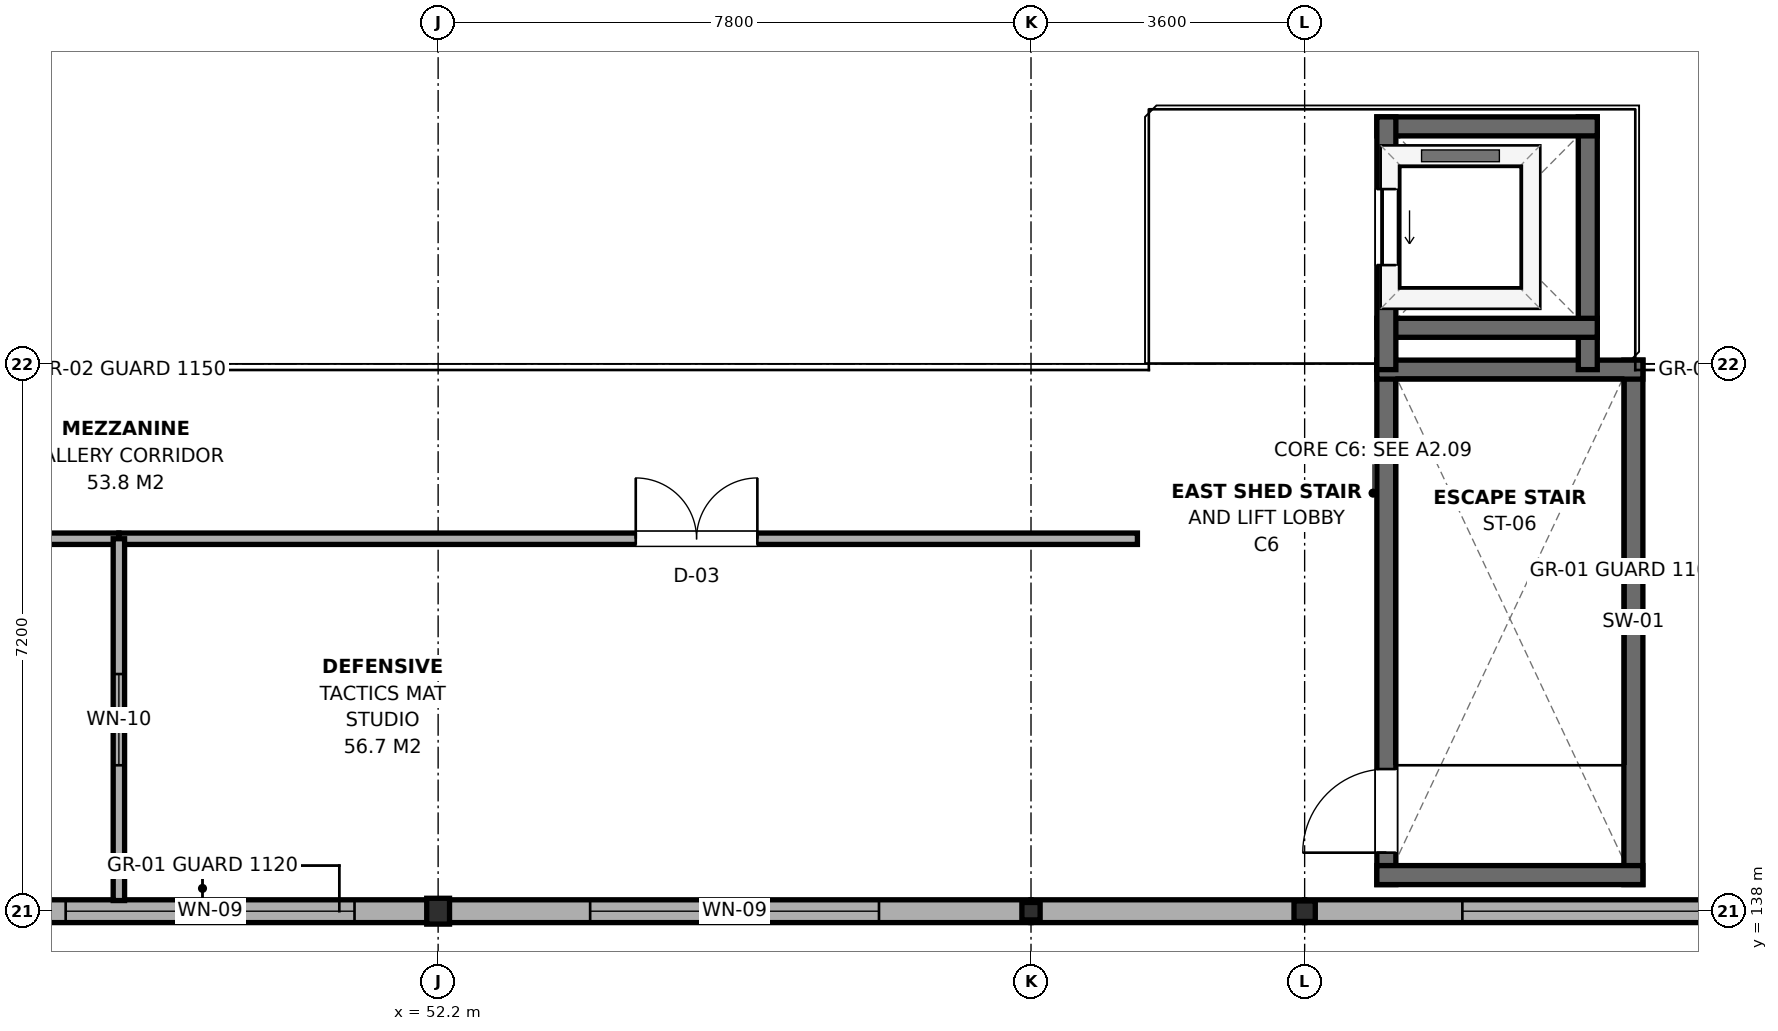
"""IFC4 building model, lengths in metres.
Left out: names, types, materials, properties, quantities, classifications, styles, units other than length and angle.
Written with IfcOpenShell. Run it as: python <this file> out.ifc"""

import sys

from ifc_helpers import new_model, si_unit, direction, frame, frame_2d, origin, origin_2d, place, context, subcontext, project, spatial, rectangle, i_section, extrude, element, fill, save


model = new_model("IFC4")
c1 = context("Model", 3, precision=1e-05, world=origin(), true_north=direction((0.0, 1.0)))
c2 = subcontext(c1, "Body", "Model", "MODEL_VIEW")
j1 = project(units=[si_unit("LENGTHUNIT", "METRE"), si_unit("PLANEANGLEUNIT", "RADIAN")], contexts=[c1])
p1 = place(None, origin())
s1 = spatial("IfcSite", under=j1, at=p1, CompositionType="ELEMENT")
p2 = place(p1, origin())
s2 = spatial("IfcBuilding", under=s1, at=p2, CompositionType="ELEMENT")
p3 = place(p2, frame((0.0, 0.0, 4.8)))
s3 = spatial("IfcBuildingStorey", under=s2, at=p3, CompositionType="ELEMENT", Elevation=4.8)
p4 = place(p3, frame((52.2, 138.0, 0.0), z_axis=(0.0, 0.0, 1.0), x_axis=(1.0, 0.0, 0.0)))
e1 = element("IfcColumn", 1, at=p4, inside=s3, PredefinedType="COLUMN", context=c2, shape_type="SweptSolid", body=[
    extrude(i_section(OverallWidth=0.3, OverallDepth=0.34, WebThickness=0.012, FlangeThickness=0.021, FilletRadius=0.027, at=origin_2d()), origin(), (0.0, 0.0, 1.0), 4.65),
])
p5 = place(p3, frame((60.0, 138.0, 0.0), z_axis=(0.0, 0.0, 1.0), x_axis=(1.0, 0.0, 0.0)))
e2 = element("IfcColumn", 2, at=p5, inside=s3, PredefinedType="COLUMN", context=c2, shape_type="SweptSolid", body=[
    extrude(i_section(OverallWidth=0.24, OverallDepth=0.23, WebThickness=0.008, FlangeThickness=0.012, FilletRadius=0.021, at=origin_2d()), origin(), (0.0, 0.0, 1.0), 4.65),
])
p6 = place(p3, frame((63.6, 138.0, 0.0), z_axis=(0.0, 0.0, 1.0), x_axis=(1.0, 0.0, 0.0)))
e3 = element("IfcColumn", 3, at=p6, inside=s3, PredefinedType="COLUMN", context=c2, shape_type="SweptSolid", body=[
    extrude(i_section(OverallWidth=0.28, OverallDepth=0.27, WebThickness=0.008, FlangeThickness=0.013, FilletRadius=0.024, at=origin_2d()), origin(), (0.0, 0.0, 1.0), 4.65),
])
p7 = place(p3, frame((46.2, 138.0, 0.0), z_axis=(0.0, 0.0, 1.0), x_axis=(1.0, 0.0, 0.0)))
e4 = element("IfcWall", 4, at=p7, inside=s3, PredefinedType="SOLIDWALL", context=c2, shape_type="SweptSolid", body=[
    extrude(rectangle(XDim=6.0, YDim=0.3, at=frame_2d((3.0, 0.0))), origin(), (0.0, 0.0, 1.0), 3.98),
])
p8 = place(p7, frame((1.1, 0.0, 1.35)))
e5 = element("IfcOpeningElement", 5, at=p8, cuts=e4, PredefinedType="OPENING", context=c2, shape_type="SweptSolid", body=[
    extrude(rectangle(XDim=3.8, YDim=1.6, at=frame_2d((1.9, 0.8))), frame((0.0, 0.165, 0.0), z_axis=(0.0, -1.0, 0.0), x_axis=(1.0, 0.0, 0.0)), (0.0, 0.0, 1.0), 0.33),
])
p9 = place(p3, frame((52.2, 138.0, 0.0), z_axis=(0.0, 0.0, 1.0), x_axis=(1.0, 0.0, 0.0)))
e6 = element("IfcWall", 6, at=p9, inside=s3, PredefinedType="SOLIDWALL", context=c2, shape_type="SweptSolid", body=[
    extrude(rectangle(XDim=7.8, YDim=0.3, at=frame_2d((3.9, 0.0))), origin(), (0.0, 0.0, 1.0), 3.98),
])
p10 = place(p9, frame((2.0, 0.0, 1.35)))
e7 = element("IfcOpeningElement", 7, at=p10, cuts=e6, PredefinedType="OPENING", context=c2, shape_type="SweptSolid", body=[
    extrude(rectangle(XDim=3.8, YDim=1.6, at=frame_2d((1.9, 0.8))), frame((0.0, 0.165, 0.0), z_axis=(0.0, -1.0, 0.0), x_axis=(1.0, 0.0, 0.0)), (0.0, 0.0, 1.0), 0.33),
])
p11 = place(p3, frame((60.0, 138.0, 0.0), z_axis=(0.0, 0.0, 1.0), x_axis=(1.0, 0.0, 0.0)))
e8 = element("IfcWall", 8, at=p11, inside=s3, PredefinedType="SOLIDWALL", context=c2, shape_type="SweptSolid", body=[
    extrude(rectangle(XDim=3.6, YDim=0.3, at=frame_2d((1.8, 0.0))), origin(), (0.0, 0.0, 1.0), 3.98),
])
p12 = place(p3, frame((63.6, 138.0, 0.0), z_axis=(0.0, 0.0, 1.0), x_axis=(1.0, 0.0, 0.0)))
e9 = element("IfcWall", 9, at=p12, inside=s3, PredefinedType="SOLIDWALL", context=c2, shape_type="SweptSolid", body=[
    extrude(rectangle(XDim=7.95, YDim=0.3, at=frame_2d((3.975, 0.0))), origin(), (0.0, 0.0, 1.0), 3.98),
])
p13 = place(p12, frame((2.075, 0.0, 1.35)))
e10 = element("IfcOpeningElement", 10, at=p13, cuts=e9, PredefinedType="OPENING", context=c2, shape_type="SweptSolid", body=[
    extrude(rectangle(XDim=3.8, YDim=1.6, at=frame_2d((1.9, 0.8))), frame((0.0, 0.165, 0.0), z_axis=(0.0, -1.0, 0.0), x_axis=(1.0, 0.0, 0.0)), (0.0, 0.0, 1.0), 0.33),
])
p14 = place(p3, frame((64.675, 138.35, 0.0), z_axis=(0.0, 0.0, 1.0), x_axis=(0.0, 1.0, 0.0)))
e11 = element("IfcWall", 11, at=p14, inside=s3, PredefinedType="SHEAR", context=c2, shape_type="SweptSolid", body=[
    extrude(rectangle(XDim=6.9, YDim=0.25, at=frame_2d((3.45, 0.0))), origin(), (0.0, 0.0, 1.0), 4.25),
])
p15 = place(p14, frame((0.42, 0.0, 0.0)))
e12 = element("IfcOpeningElement", 12, at=p15, cuts=e11, PredefinedType="OPENING", context=c2, shape_type="SweptSolid", body=[
    extrude(rectangle(XDim=1.1, YDim=2.15, at=frame_2d((0.55, 1.075))), frame((0.0, 0.14, 0.0), z_axis=(0.0, -1.0, 0.0), x_axis=(1.0, 0.0, 0.0)), (0.0, 0.0, 1.0), 0.28),
])
p16 = place(p3, frame((67.925, 138.35, 0.0), z_axis=(0.0, 0.0, 1.0), x_axis=(0.0, 1.0, 0.0)))
e13 = element("IfcWall", 13, at=p16, inside=s3, PredefinedType="SHEAR", context=c2, shape_type="SweptSolid", body=[
    extrude(rectangle(XDim=6.9, YDim=0.25, at=frame_2d((3.45, 0.0))), origin(), (0.0, 0.0, 1.0), 4.25),
])
for number, where, z_axis, x_axis in (
    (14, (64.55, 138.475, 0.0), (0.0, 0.0, 1.0), (1.0, 0.0, 0.0)),
    (15, (64.55, 145.125, 0.0), (0.0, 0.0, 1.0), (1.0, 0.0, 0.0)),
):
    element("IfcWall", number, at=place(p3, frame(where, z_axis=z_axis, x_axis=x_axis)), inside=s3, PredefinedType="SHEAR", context=c2, shape_type="SweptSolid", body=[
        extrude(rectangle(XDim=3.5, YDim=0.25, at=frame_2d((1.75, 0.0))), origin(), (0.0, 0.0, 1.0), 4.25),
    ])
p17 = place(p3, frame((67.325, 145.125, -0.24), z_axis=(0.0, 0.0, 1.0), x_axis=(0.0, 1.0, 0.0)))
e16 = element("IfcWall", 16, at=p17, inside=s3, PredefinedType="SHEAR", context=c2, shape_type="SweptSolid", body=[
    extrude(rectangle(XDim=3.325, YDim=0.25, at=frame_2d((1.663, 0.0))), origin(), (0.0, 0.0, 1.0), 4.22),
])
for number, where, z_axis, x_axis in (
    (17, (64.55, 145.675, -0.24), (0.0, 0.0, 1.0), (1.0, 0.0, 0.0)),
    (18, (64.55, 148.325, -0.24), (0.0, 0.0, 1.0), (1.0, 0.0, 0.0)),
):
    element("IfcWall", number, at=place(p3, frame(where, z_axis=z_axis, x_axis=x_axis)), inside=s3, PredefinedType="SHEAR", context=c2, shape_type="SweptSolid", body=[
        extrude(rectangle(XDim=2.9, YDim=0.25, at=frame_2d((1.45, 0.0))), origin(), (0.0, 0.0, 1.0), 4.22),
    ])
p18 = place(p3, frame((64.675, 145.125, -0.24), z_axis=(0.0, 0.0, 1.0), x_axis=(0.0, 1.0, 0.0)))
e19 = element("IfcWall", 19, at=p18, inside=s3, PredefinedType="SHEAR", context=c2, shape_type="SweptSolid", body=[
    extrude(rectangle(XDim=3.325, YDim=0.25, at=frame_2d((1.663, 0.0))), origin(), (0.0, 0.0, 1.0), 4.22),
])
p19 = place(p18, frame((1.375, 0.0, 0.24)))
e20 = element("IfcOpeningElement", 20, at=p19, cuts=e19, PredefinedType="OPENING", context=c2, shape_type="SweptSolid", body=[
    extrude(rectangle(XDim=1.0, YDim=2.15, at=frame_2d((0.5, 1.075))), frame((0.0, 0.14, 0.0), z_axis=(0.0, -1.0, 0.0), x_axis=(1.0, 0.0, 0.0)), (0.0, 0.0, 1.0), 0.28),
])
p20 = place(p3, frame((33.8, 142.9, 0.0), z_axis=(0.0, 0.0, 1.0), x_axis=(1.0, 0.0, 0.0)))
e21 = element("IfcWall", 21, at=p20, inside=s3, PredefinedType="PARTITIONING", context=c2, shape_type="SweptSolid", body=[
    extrude(rectangle(XDim=14.2, YDim=0.15, at=frame_2d((7.1, 0.0))), origin(), (0.0, 0.0, 1.0), 3.975),
])
p21 = place(p20, frame((2.6, 0.0, 0.0)))
e22 = element("IfcOpeningElement", 22, at=p21, cuts=e21, PredefinedType="OPENING", context=c2, shape_type="SweptSolid", body=[
    extrude(rectangle(XDim=1.6, YDim=2.15, at=frame_2d((0.8, 1.075))), frame((0.0, 0.09, 0.0), z_axis=(0.0, -1.0, 0.0), x_axis=(1.0, 0.0, 0.0)), (0.0, 0.0, 1.0), 0.18),
])
p22 = place(p20, frame((8.924, 0.0, 0.95)))
e23 = element("IfcOpeningElement", 23, at=p22, cuts=e21, PredefinedType="OPENING", context=c2, shape_type="SweptSolid", body=[
    extrude(rectangle(XDim=2.6, YDim=1.5, at=frame_2d((1.3, 0.75))), frame((0.0, 0.09, 0.0), z_axis=(0.0, -1.0, 0.0), x_axis=(1.0, 0.0, 0.0)), (0.0, 0.0, 1.0), 0.18),
])
p23 = place(p3, frame((48.0, 142.9, 0.0), z_axis=(0.0, 0.0, 1.0), x_axis=(1.0, 0.0, 0.0)))
e24 = element("IfcWall", 24, at=p23, inside=s3, PredefinedType="PARTITIONING", context=c2, shape_type="SweptSolid", body=[
    extrude(rectangle(XDim=13.4, YDim=0.15, at=frame_2d((6.7, 0.0))), origin(), (0.0, 0.0, 1.0), 3.975),
])
p24 = place(p23, frame((6.8, 0.0, 0.0)))
e25 = element("IfcOpeningElement", 25, at=p24, cuts=e24, PredefinedType="OPENING", context=c2, shape_type="SweptSolid", body=[
    extrude(rectangle(XDim=1.6, YDim=2.15, at=frame_2d((0.8, 1.075))), frame((0.0, 0.09, 0.0), z_axis=(0.0, -1.0, 0.0), x_axis=(1.0, 0.0, 0.0)), (0.0, 0.0, 1.0), 0.18),
])
p25 = place(p3, frame((48.0, 138.14, 0.0), z_axis=(0.0, 0.0, 1.0), x_axis=(0.0, 1.0, 0.0)))
e26 = element("IfcWall", 26, at=p25, inside=s3, PredefinedType="PARTITIONING", context=c2, shape_type="SweptSolid", body=[
    extrude(rectangle(XDim=4.76, YDim=0.15, at=frame_2d((2.38, 0.0))), origin(), (0.0, 0.0, 1.0), 3.975),
])
p26 = place(p25, frame((1.78, 0.0, 0.95)))
e27 = element("IfcOpeningElement", 27, at=p26, cuts=e26, PredefinedType="OPENING", context=c2, shape_type="SweptSolid", body=[
    extrude(rectangle(XDim=1.2, YDim=1.5, at=frame_2d((0.6, 0.75))), frame((0.0, 0.09, 0.0), z_axis=(0.0, -1.0, 0.0), x_axis=(1.0, 0.0, 0.0)), (0.0, 0.0, 1.0), 0.18),
])
p27 = place(p8, origin())
e28 = element("IfcWindow", 28, at=p27, inside=s3, PartitioningType="SINGLE_PANEL", PredefinedType="WINDOW", context=c2, shape_type="SweptSolid", body=[
    extrude(rectangle(XDim=3.8, YDim=1.6, at=frame_2d((1.9, 0.8))), frame((0.0, 0.03, 0.0), z_axis=(0.0, -1.0, 0.0), x_axis=(1.0, 0.0, 0.0)), (0.0, 0.0, 1.0), 0.06),
])
fill(e5, e28)
p28 = place(p10, origin())
e29 = element("IfcWindow", 29, at=p28, inside=s3, PartitioningType="SINGLE_PANEL", PredefinedType="WINDOW", context=c2, shape_type="SweptSolid", body=[
    extrude(rectangle(XDim=3.8, YDim=1.6, at=frame_2d((1.9, 0.8))), frame((0.0, 0.03, 0.0), z_axis=(0.0, -1.0, 0.0), x_axis=(1.0, 0.0, 0.0)), (0.0, 0.0, 1.0), 0.06),
])
fill(e7, e29)
p29 = place(p13, origin())
e30 = element("IfcWindow", 30, at=p29, inside=s3, PartitioningType="SINGLE_PANEL", PredefinedType="WINDOW", context=c2, shape_type="SweptSolid", body=[
    extrude(rectangle(XDim=3.8, YDim=1.6, at=frame_2d((1.9, 0.8))), frame((0.0, 0.03, 0.0), z_axis=(0.0, -1.0, 0.0), x_axis=(1.0, 0.0, 0.0)), (0.0, 0.0, 1.0), 0.06),
])
fill(e10, e30)
p30 = place(p15, origin())
e31 = element("IfcDoor", 31, at=p30, inside=s3, OperationType="SINGLE_SWING_LEFT", PredefinedType="DOOR", context=c2, shape_type="SweptSolid", body=[
    extrude(rectangle(XDim=1.1, YDim=2.15, at=frame_2d((0.55, 1.075))), frame((0.0, 0.025, 0.0), z_axis=(0.0, -1.0, 0.0), x_axis=(1.0, 0.0, 0.0)), (0.0, 0.0, 1.0), 0.05),
])
fill(e12, e31)
p31 = place(p19, origin())
e32 = element("IfcDoor", 32, at=p31, inside=s3, OperationType="SLIDING_TO_LEFT", PredefinedType="DOOR", context=c2, shape_type="SweptSolid", body=[
    extrude(rectangle(XDim=1.0, YDim=2.15, at=frame_2d((0.5, 1.075))), frame((0.0, 0.025, 0.0), z_axis=(0.0, -1.0, 0.0), x_axis=(1.0, 0.0, 0.0)), (0.0, 0.0, 1.0), 0.05),
])
fill(e20, e32)
p32 = place(p24, origin())
e33 = element("IfcDoor", 33, at=p32, inside=s3, OperationType="DOUBLE_DOOR_SINGLE_SWING", PredefinedType="DOOR", context=c2, shape_type="SweptSolid", body=[
    extrude(rectangle(XDim=1.6, YDim=2.15, at=frame_2d((0.8, 1.075))), frame((0.0, 0.025, 0.0), z_axis=(0.0, -1.0, 0.0), x_axis=(1.0, 0.0, 0.0)), (0.0, 0.0, 1.0), 0.05),
])
fill(e25, e33)
p33 = place(p26, origin())
e34 = element("IfcWindow", 34, at=p33, inside=s3, PartitioningType="SINGLE_PANEL", PredefinedType="WINDOW", context=c2, shape_type="SweptSolid", body=[
    extrude(rectangle(XDim=1.2, YDim=1.5, at=frame_2d((0.6, 0.75))), frame((0.0, 0.03, 0.0), z_axis=(0.0, -1.0, 0.0), x_axis=(1.0, 0.0, 0.0)), (0.0, 0.0, 1.0), 0.06),
])
fill(e27, e34)
save(model, sys.argv[1])
